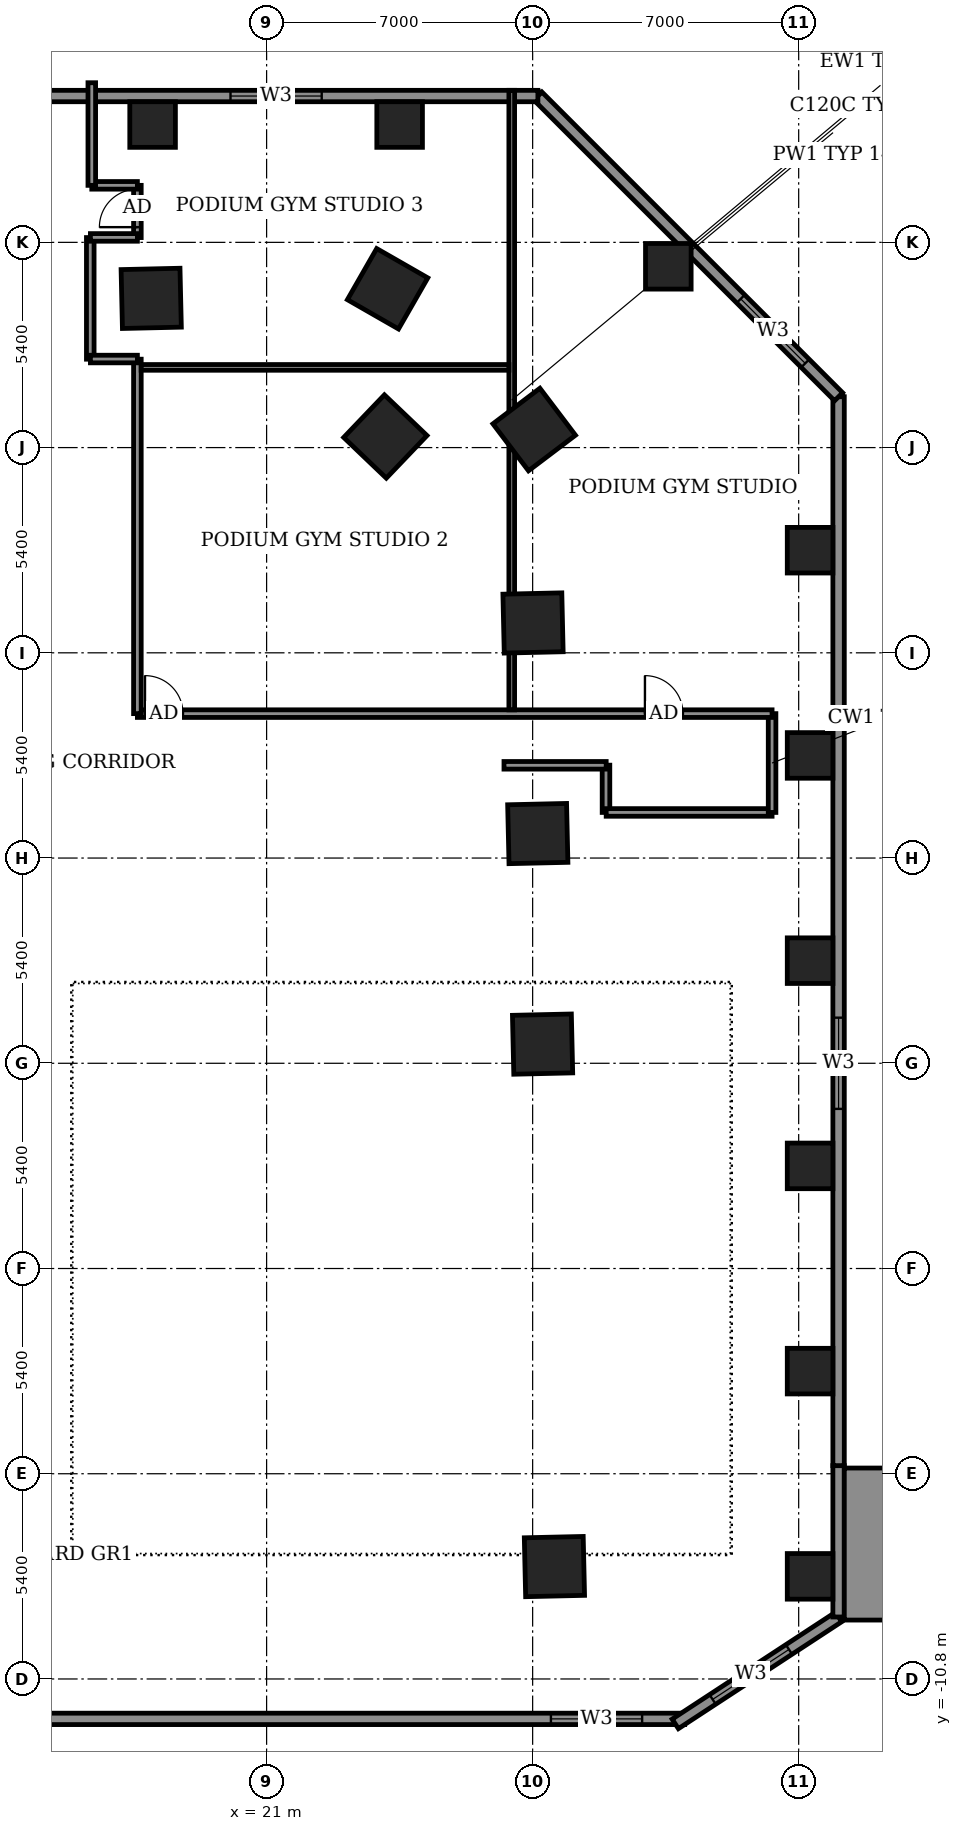
"""IFC4 building model, lengths in metres.
Left out: names, types, materials, properties, quantities, classifications, styles, units other than length and angle.
Written with IfcOpenShell. Run it as: python <this file> out.ifc"""

import sys

from ifc_helpers import new_model, si_unit, direction, frame, frame_2d, origin, origin_2d, place, context, subcontext, project, spatial, rectangle, extrude, element, fill, save


model = new_model("IFC4")
c1 = context("Model", 3, precision=1e-05, world=origin(), true_north=direction((0.0, 1.0)))
c2 = subcontext(c1, "Body", "Model", "MODEL_VIEW")
j1 = project(units=[si_unit("LENGTHUNIT", "METRE"), si_unit("PLANEANGLEUNIT", "RADIAN")], contexts=[c1])
p1 = place(None, origin())
s1 = spatial("IfcSite", under=j1, at=p1, CompositionType="ELEMENT")
p2 = place(p1, origin())
s2 = spatial("IfcBuilding", under=s1, at=p2, CompositionType="ELEMENT")
p3 = place(p2, frame((0.0, 0.0, 16.0)))
s3 = spatial("IfcBuildingStorey", under=s2, at=p3, CompositionType="ELEMENT", Elevation=16.0)
for number, where, z_axis, x_axis in (
    (1, (28.573, -7.843, -0.55), (0.0, 0.0, 1.0), (-0.023, 1.0, 0.0)),
    (2, (28.261, 5.904, -0.55), (0.0, 0.0, 1.0), (-0.023, 1.0, 0.0)),
    (3, (28.135, 11.444, -0.55), (0.0, 0.0, 1.0), (-0.023, 1.0, 0.0)),
    (4, (28.01, 16.985, -0.55), (0.0, 0.0, 1.0), (-0.023, 1.0, 0.0)),
    (5, (28.041, 22.075, -0.55), (0.0, 0.0, 1.0), (-0.604, 0.797, 0.0)),
    (6, (24.125, 21.892, -0.55), (0.0, 0.0, 1.0), (-0.723, 0.691, 0.0)),
    (7, (24.184, 25.779, -0.55), (0.0, 0.0, 1.0), (-0.868, 0.497, 0.0)),
    (8, (17.964, 25.526, -0.55), (0.0, 0.0, 1.0), (-1.0, -0.023, 0.0)),
):
    element("IfcColumn", number, at=place(p3, frame(where, z_axis=z_axis, x_axis=x_axis)), inside=s3, PredefinedType="COLUMN", context=c2, shape_type="SweptSolid", body=[
        extrude(rectangle(XDim=1.55, YDim=1.55, at=origin_2d()), origin(), (0.0, 0.0, 1.0), 4.5),
    ])
for number, where, z_axis, x_axis in (
    (9, (18.0, 30.1, -0.55), (0.0, 0.0, 1.0), (1.0, 0.0, 0.0)),
    (10, (24.5, 30.1, -0.55), (0.0, 0.0, 1.0), (1.0, 0.0, 0.0)),
    (11, (35.3, -8.1, -0.55), (0.0, 0.0, 1.0), (1.0, 0.0, 0.0)),
    (12, (35.3, -2.7, -0.55), (0.0, 0.0, 1.0), (1.0, 0.0, 0.0)),
    (13, (35.3, 2.7, -0.55), (0.0, 0.0, 1.0), (1.0, 0.0, 0.0)),
    (14, (35.3, 8.1, -0.55), (0.0, 0.0, 1.0), (1.0, 0.0, 0.0)),
    (15, (35.3, 13.5, -0.55), (0.0, 0.0, 1.0), (1.0, 0.0, 0.0)),
    (16, (35.3, 18.9, -0.55), (0.0, 0.0, 1.0), (1.0, 0.0, 0.0)),
    (17, (31.57, 26.37, -0.55), (0.0, 0.0, 1.0), (1.0, 0.0, 0.0)),
):
    element("IfcColumn", number, at=place(p3, frame(where, z_axis=z_axis, x_axis=x_axis)), inside=s3, PredefinedType="COLUMN", context=c2, shape_type="SweptSolid", body=[
        extrude(rectangle(XDim=1.2, YDim=1.2, at=origin_2d()), origin(), (0.0, 0.0, 1.0), 4.5),
    ])
p4 = place(p3, frame((15.0, -11.85, 0.0), z_axis=(0.0, 0.0, 1.0), x_axis=(1.0, 0.0, 0.0)))
e18 = element("IfcWall", 18, at=p4, inside=s3, PredefinedType="SOLIDWALL", context=c2, shape_type="SweptSolid", body=[
    extrude(rectangle(XDim=17.0, YDim=0.3, at=frame_2d((8.5, 0.0))), origin(), (0.0, 0.0, 1.0), 3.95),
])
p5 = place(p4, frame((13.481, 0.0, 0.9)))
e19 = element("IfcOpeningElement", 19, at=p5, cuts=e18, PredefinedType="OPENING", context=c2, shape_type="SweptSolid", body=[
    extrude(rectangle(XDim=2.4, YDim=1.8, at=frame_2d((1.2, 0.9))), frame((0.0, 0.16, 0.0), z_axis=(0.0, -1.0, 0.0), x_axis=(1.0, 0.0, 0.0)), (0.0, 0.0, 1.0), 0.32),
])
p6 = place(p3, frame((31.753, -11.982, 0.0), z_axis=(0.0, 0.0, 1.0), x_axis=(0.836672208926, 0.547703948142, 0.0)))
e20 = element("IfcWall", 20, at=p6, inside=s3, PredefinedType="SOLIDWALL", context=c2, shape_type="SweptSolid", body=[
    extrude(rectangle(XDim=5.136, YDim=0.3, at=frame_2d((2.568, 0.0))), origin(), (0.0, 0.0, 1.0), 3.95),
])
p7 = place(p6, frame((1.175, 0.0, 0.9)))
e21 = element("IfcOpeningElement", 21, at=p7, cuts=e20, PredefinedType="OPENING", context=c2, shape_type="SweptSolid", body=[
    extrude(rectangle(XDim=2.4, YDim=1.8, at=frame_2d((1.2, 0.9))), frame((0.0, 0.16, 0.0), z_axis=(0.0, -1.0, 0.0), x_axis=(1.0, 0.0, 0.0)), (0.0, 0.0, 1.0), 0.32),
])
p8 = place(p3, frame((36.05, -9.169, 0.0), z_axis=(0.0, 0.0, 1.0), x_axis=(0.0, 1.0, 0.0)))
e22 = element("IfcWall", 22, at=p8, inside=s3, PredefinedType="SOLIDWALL", context=c2, shape_type="SweptSolid", body=[
    extrude(rectangle(XDim=3.982, YDim=0.3, at=frame_2d((1.991, 0.0))), origin(), (0.0, 0.0, 1.0), 3.95),
])
p9 = place(p3, frame((36.05, -5.187, 0.0), z_axis=(0.0, 0.0, 1.0), x_axis=(0.0, 1.0, 0.0)))
e23 = element("IfcWall", 23, at=p9, inside=s3, PredefinedType="SOLIDWALL", context=c2, shape_type="SweptSolid", body=[
    extrude(rectangle(XDim=28.125, YDim=0.3, at=frame_2d((14.062, 0.0))), origin(), (0.0, 0.0, 1.0), 3.95),
])
p10 = place(p9, frame((9.387, 0.0, 0.9)))
e24 = element("IfcOpeningElement", 24, at=p10, cuts=e23, PredefinedType="OPENING", context=c2, shape_type="SweptSolid", body=[
    extrude(rectangle(XDim=2.4, YDim=1.8, at=frame_2d((1.2, 0.9))), frame((0.0, 0.16, 0.0), z_axis=(0.0, -1.0, 0.0), x_axis=(1.0, 0.0, 0.0)), (0.0, 0.0, 1.0), 0.32),
])
p11 = place(p3, frame((36.05, 22.938, 0.0), z_axis=(0.0, 0.0, 1.0), x_axis=(-0.707106781187, 0.707106781187, 0.0)))
e25 = element("IfcWall", 25, at=p11, inside=s3, PredefinedType="SOLIDWALL", context=c2, shape_type="SweptSolid", body=[
    extrude(rectangle(XDim=11.189, YDim=0.3, at=frame_2d((5.595, 0.0))), origin(), (0.0, 0.0, 1.0), 3.95),
])
p12 = place(p11, frame((1.242, 0.0, 0.9)))
e26 = element("IfcOpeningElement", 26, at=p12, cuts=e25, PredefinedType="OPENING", context=c2, shape_type="SweptSolid", body=[
    extrude(rectangle(XDim=2.4, YDim=1.8, at=frame_2d((1.2, 0.9))), frame((0.0, 0.16, 0.0), z_axis=(0.0, -1.0, 0.0), x_axis=(1.0, 0.0, 0.0)), (0.0, 0.0, 1.0), 0.32),
])
p13 = place(p3, frame((28.138, 30.85, 0.0), z_axis=(0.0, 0.0, 1.0), x_axis=(-1.0, 0.0, 0.0)))
e27 = element("IfcWall", 27, at=p13, inside=s3, PredefinedType="SOLIDWALL", context=c2, shape_type="SweptSolid", body=[
    extrude(rectangle(XDim=56.276, YDim=0.3, at=frame_2d((28.138, 0.0))), origin(), (0.0, 0.0, 1.0), 3.95),
])
p14 = place(p13, frame((5.688, 0.0, 0.9)))
e28 = element("IfcOpeningElement", 28, at=p14, cuts=e27, PredefinedType="OPENING", context=c2, shape_type="SweptSolid", body=[
    extrude(rectangle(XDim=2.4, YDim=1.8, at=frame_2d((1.2, 0.9))), frame((0.0, 0.16, 0.0), z_axis=(0.0, -1.0, 0.0), x_axis=(1.0, 0.0, 0.0)), (0.0, 0.0, 1.0), 0.32),
])
p15 = place(p13, frame((18.638, 0.0, 0.9)))
e29 = element("IfcOpeningElement", 29, at=p15, cuts=e27, PredefinedType="OPENING", context=c2, shape_type="SweptSolid", body=[
    extrude(rectangle(XDim=2.4, YDim=1.8, at=frame_2d((1.2, 0.9))), frame((0.0, 0.16, 0.0), z_axis=(0.0, -1.0, 0.0), x_axis=(1.0, 0.0, 0.0)), (0.0, 0.0, 1.0), 0.32),
])
p16 = place(p13, frame((26.178, 0.0, 0.9)))
e30 = element("IfcOpeningElement", 30, at=p16, cuts=e27, PredefinedType="OPENING", context=c2, shape_type="SweptSolid", body=[
    extrude(rectangle(XDim=2.4, YDim=1.8, at=frame_2d((1.2, 0.9))), frame((0.0, 0.16, 0.0), z_axis=(0.0, -1.0, 0.0), x_axis=(1.0, 0.0, 0.0)), (0.0, 0.0, 1.0), 0.32),
])
p17 = place(p13, frame((32.883, 0.0, 0.9)))
e31 = element("IfcOpeningElement", 31, at=p17, cuts=e27, PredefinedType="OPENING", context=c2, shape_type="SweptSolid", body=[
    extrude(rectangle(XDim=2.4, YDim=1.8, at=frame_2d((1.2, 0.9))), frame((0.0, 0.16, 0.0), z_axis=(0.0, -1.0, 0.0), x_axis=(1.0, 0.0, 0.0)), (0.0, 0.0, 1.0), 0.32),
])
p18 = place(p13, frame((40.263, 0.0, 0.9)))
e32 = element("IfcOpeningElement", 32, at=p18, cuts=e27, PredefinedType="OPENING", context=c2, shape_type="SweptSolid", body=[
    extrude(rectangle(XDim=2.4, YDim=1.8, at=frame_2d((1.2, 0.9))), frame((0.0, 0.16, 0.0), z_axis=(0.0, -1.0, 0.0), x_axis=(1.0, 0.0, 0.0)), (0.0, 0.0, 1.0), 0.32),
])
p19 = place(p13, frame((53.488, 0.0, 0.9)))
e33 = element("IfcOpeningElement", 33, at=p19, cuts=e27, PredefinedType="OPENING", context=c2, shape_type="SweptSolid", body=[
    extrude(rectangle(XDim=2.4, YDim=1.8, at=frame_2d((1.2, 0.9))), frame((0.0, 0.16, 0.0), z_axis=(0.0, -1.0, 0.0), x_axis=(1.0, 0.0, 0.0)), (0.0, 0.0, 1.0), 0.32),
])
p20 = place(p3, frame((37.45, -9.25, 0.0), z_axis=(0.0, 0.0, 1.0), x_axis=(0.0, 1.0, 0.0)))
e34 = element("IfcWall", 34, at=p20, inside=s3, PredefinedType="STANDARD", context=c2, shape_type="SweptSolid", body=[
    extrude(rectangle(XDim=4.0, YDim=2.5, at=frame_2d((2.0, 0.0))), origin(), (0.0, 0.0, 1.0), 4.5),
])
p21 = place(p3, frame((29.93, 12.0, 0.0), z_axis=(0.0, 0.0, 1.0), x_axis=(0.0, 1.0, 0.0)))
e35 = element("IfcWall", 35, at=p21, inside=s3, PredefinedType="PARTITIONING", context=c2, shape_type="SweptSolid", body=[
    extrude(rectangle(XDim=1.244, YDim=0.2, at=frame_2d((0.622, 0.0))), origin(), (0.0, 0.0, 1.0), 3.95),
])
p22 = place(p3, frame((29.935, 12.0, 0.0), z_axis=(0.0, 0.0, 1.0), x_axis=(1.0, 0.0, 0.0)))
e36 = element("IfcWall", 36, at=p22, inside=s3, PredefinedType="PARTITIONING", context=c2, shape_type="SweptSolid", body=[
    extrude(rectangle(XDim=4.365, YDim=0.2, at=frame_2d((2.183, 0.0))), origin(), (0.0, 0.0, 1.0), 3.95),
])
p23 = place(p3, frame((34.3, 12.0, 0.0), z_axis=(0.0, 0.0, 1.0), x_axis=(0.0, 1.0, 0.0)))
e37 = element("IfcWall", 37, at=p23, inside=s3, PredefinedType="PARTITIONING", context=c2, shape_type="SweptSolid", body=[
    extrude(rectangle(XDim=2.6, YDim=0.2, at=frame_2d((1.3, 0.0))), origin(), (0.0, 0.0, 1.0), 3.95),
])
p24 = place(p3, frame((27.246, 13.24, 0.0), z_axis=(0.0, 0.0, 1.0), x_axis=(1.0, 0.0, 0.0)))
e38 = element("IfcWall", 38, at=p24, inside=s3, PredefinedType="PARTITIONING", context=c2, shape_type="SweptSolid", body=[
    extrude(rectangle(XDim=2.689, YDim=0.2, at=frame_2d((1.344, 0.0))), origin(), (0.0, 0.0, 1.0), 3.95),
])
p25 = place(p3, frame((17.6, 14.6, 0.0), z_axis=(0.0, 0.0, 1.0), x_axis=(1.0, 0.0, 0.0)))
e39 = element("IfcWall", 39, at=p25, inside=s3, PredefinedType="PARTITIONING", context=c2, shape_type="SweptSolid", body=[
    extrude(rectangle(XDim=16.7, YDim=0.2, at=frame_2d((8.35, 0.0))), origin(), (0.0, 0.0, 1.0), 3.95),
])
p26 = place(p25, frame((13.355, 0.0, 0.0)))
e40 = element("IfcOpeningElement", 40, at=p26, cuts=e39, PredefinedType="OPENING", context=c2, shape_type="SweptSolid", body=[
    extrude(rectangle(XDim=1.0, YDim=2.1, at=frame_2d((0.5, 1.05))), frame((0.0, 0.11, 0.0), z_axis=(0.0, -1.0, 0.0), x_axis=(1.0, 0.0, 0.0)), (0.0, 0.0, 1.0), 0.22),
])
p27 = place(p25, frame((0.2, 0.0, 0.0)))
e41 = element("IfcOpeningElement", 41, at=p27, cuts=e39, PredefinedType="OPENING", context=c2, shape_type="SweptSolid", body=[
    extrude(rectangle(XDim=1.0, YDim=2.1, at=frame_2d((0.5, 1.05))), frame((0.0, 0.11, 0.0), z_axis=(0.0, -1.0, 0.0), x_axis=(1.0, 0.0, 0.0)), (0.0, 0.0, 1.0), 0.22),
])
p28 = place(p3, frame((17.6, 14.6, 0.0), z_axis=(0.0, 0.0, 1.0), x_axis=(0.0, 1.0, 0.0)))
e42 = element("IfcWall", 42, at=p28, inside=s3, PredefinedType="PARTITIONING", context=c2, shape_type="SweptSolid", body=[
    extrude(rectangle(XDim=9.326, YDim=0.2, at=frame_2d((4.663, 0.0))), origin(), (0.0, 0.0, 1.0), 3.95),
])
p29 = place(p3, frame((27.45, 14.7, 0.0), z_axis=(0.0, 0.0, 1.0), x_axis=(0.0, 1.0, 0.0)))
e43 = element("IfcWall", 43, at=p29, inside=s3, PredefinedType="PARTITIONING", context=c2, shape_type="SweptSolid", body=[
    extrude(rectangle(XDim=16.3, YDim=0.15, at=frame_2d((8.15, 0.0))), origin(), (0.0, 0.0, 1.0), 3.95),
])
p30 = place(p3, frame((17.7, 23.71, 0.0), z_axis=(0.0, 0.0, 1.0), x_axis=(1.0, 0.0, 0.0)))
e44 = element("IfcWall", 44, at=p30, inside=s3, PredefinedType="PARTITIONING", context=c2, shape_type="SweptSolid", body=[
    extrude(rectangle(XDim=9.675, YDim=0.15, at=frame_2d((4.837, 0.0))), origin(), (0.0, 0.0, 1.0), 3.95),
])
p31 = place(p3, frame((16.36, 23.926, 0.0), z_axis=(0.0, 0.0, 1.0), x_axis=(0.0, 1.0, 0.0)))
e45 = element("IfcWall", 45, at=p31, inside=s3, PredefinedType="PARTITIONING", context=c2, shape_type="SweptSolid", body=[
    extrude(rectangle(XDim=3.2, YDim=0.2, at=frame_2d((1.6, 0.0))), origin(), (0.0, 0.0, 1.0), 3.95),
])
p32 = place(p3, frame((16.364, 23.93, 0.0), z_axis=(0.0, 0.0, 1.0), x_axis=(1.0, 0.0, 0.0)))
e46 = element("IfcWall", 46, at=p32, inside=s3, PredefinedType="PARTITIONING", context=c2, shape_type="SweptSolid", body=[
    extrude(rectangle(XDim=1.236, YDim=0.2, at=frame_2d((0.618, 0.0))), origin(), (0.0, 0.0, 1.0), 3.95),
])
p33 = place(p3, frame((17.6, 27.126, 0.0), z_axis=(0.0, 0.0, 1.0), x_axis=(0.0, 1.0, 0.0)))
e47 = element("IfcWall", 47, at=p33, inside=s3, PredefinedType="PARTITIONING", context=c2, shape_type="SweptSolid", body=[
    extrude(rectangle(XDim=1.374, YDim=0.2, at=frame_2d((0.687, 0.0))), origin(), (0.0, 0.0, 1.0), 3.95),
])
p34 = place(p33, frame((0.274, 0.0, 0.0)))
e48 = element("IfcOpeningElement", 48, at=p34, cuts=e47, PredefinedType="OPENING", context=c2, shape_type="SweptSolid", body=[
    extrude(rectangle(XDim=1.0, YDim=2.1, at=frame_2d((0.5, 1.05))), frame((0.0, 0.11, 0.0), z_axis=(0.0, -1.0, 0.0), x_axis=(1.0, 0.0, 0.0)), (0.0, 0.0, 1.0), 0.22),
])
p35 = place(p3, frame((16.364, 27.13, 0.0), z_axis=(0.0, 0.0, 1.0), x_axis=(1.0, 0.0, 0.0)))
e49 = element("IfcWall", 49, at=p35, inside=s3, PredefinedType="PARTITIONING", context=c2, shape_type="SweptSolid", body=[
    extrude(rectangle(XDim=1.236, YDim=0.2, at=frame_2d((0.618, 0.0))), origin(), (0.0, 0.0, 1.0), 3.95),
])
p36 = place(p3, frame((16.4, 28.5, 0.0), z_axis=(0.0, 0.0, 1.0), x_axis=(1.0, 0.0, 0.0)))
e50 = element("IfcWall", 50, at=p36, inside=s3, PredefinedType="PARTITIONING", context=c2, shape_type="SweptSolid", body=[
    extrude(rectangle(XDim=1.2, YDim=0.2, at=frame_2d((0.6, 0.0))), origin(), (0.0, 0.0, 1.0), 3.95),
])
p37 = place(p3, frame((16.4, 28.5, 0.0), z_axis=(0.0, 0.0, 1.0), x_axis=(0.0, 1.0, 0.0)))
e51 = element("IfcWall", 51, at=p37, inside=s3, PredefinedType="PARTITIONING", context=c2, shape_type="SweptSolid", body=[
    extrude(rectangle(XDim=2.7, YDim=0.2, at=frame_2d((1.35, 0.0))), origin(), (0.0, 0.0, 1.0), 3.95),
])
p38 = place(p5, origin())
e52 = element("IfcWindow", 52, at=p38, inside=s3, PartitioningType="DOUBLE_PANEL_VERTICAL", PredefinedType="WINDOW", context=c2, shape_type="SweptSolid", body=[
    extrude(rectangle(XDim=2.4, YDim=1.8, at=frame_2d((1.2, 0.9))), frame((0.0, 0.03, 0.0), z_axis=(0.0, -1.0, 0.0), x_axis=(1.0, 0.0, 0.0)), (0.0, 0.0, 1.0), 0.06),
])
fill(e19, e52)
p39 = place(p7, origin())
e53 = element("IfcWindow", 53, at=p39, inside=s3, PartitioningType="DOUBLE_PANEL_VERTICAL", PredefinedType="WINDOW", context=c2, shape_type="SweptSolid", body=[
    extrude(rectangle(XDim=2.4, YDim=1.8, at=frame_2d((1.2, 0.9))), frame((0.0, 0.03, 0.0), z_axis=(0.0, -1.0, 0.0), x_axis=(1.0, 0.0, 0.0)), (0.0, 0.0, 1.0), 0.06),
])
fill(e21, e53)
p40 = place(p10, origin())
e54 = element("IfcWindow", 54, at=p40, inside=s3, PartitioningType="DOUBLE_PANEL_VERTICAL", PredefinedType="WINDOW", context=c2, shape_type="SweptSolid", body=[
    extrude(rectangle(XDim=2.4, YDim=1.8, at=frame_2d((1.2, 0.9))), frame((0.0, 0.03, 0.0), z_axis=(0.0, -1.0, 0.0), x_axis=(1.0, 0.0, 0.0)), (0.0, 0.0, 1.0), 0.06),
])
fill(e24, e54)
p41 = place(p12, origin())
e55 = element("IfcWindow", 55, at=p41, inside=s3, PartitioningType="DOUBLE_PANEL_VERTICAL", PredefinedType="WINDOW", context=c2, shape_type="SweptSolid", body=[
    extrude(rectangle(XDim=2.4, YDim=1.8, at=frame_2d((1.2, 0.9))), frame((0.0, 0.03, 0.0), z_axis=(0.0, -1.0, 0.0), x_axis=(1.0, 0.0, 0.0)), (0.0, 0.0, 1.0), 0.06),
])
fill(e26, e55)
p42 = place(p14, origin())
e56 = element("IfcWindow", 56, at=p42, inside=s3, PartitioningType="DOUBLE_PANEL_VERTICAL", PredefinedType="WINDOW", context=c2, shape_type="SweptSolid", body=[
    extrude(rectangle(XDim=2.4, YDim=1.8, at=frame_2d((1.2, 0.9))), frame((0.0, 0.03, 0.0), z_axis=(0.0, -1.0, 0.0), x_axis=(1.0, 0.0, 0.0)), (0.0, 0.0, 1.0), 0.06),
])
fill(e28, e56)
p43 = place(p26, origin())
e57 = element("IfcDoor", 57, at=p43, inside=s3, OperationType="SINGLE_SWING_LEFT", PredefinedType="DOOR", context=c2, shape_type="SweptSolid", body=[
    extrude(rectangle(XDim=1.0, YDim=2.1, at=frame_2d((0.5, 1.05))), frame((0.0, 0.025, 0.0), z_axis=(0.0, -1.0, 0.0), x_axis=(1.0, 0.0, 0.0)), (0.0, 0.0, 1.0), 0.05),
])
fill(e40, e57)
p44 = place(p27, origin())
e58 = element("IfcDoor", 58, at=p44, inside=s3, OperationType="SINGLE_SWING_RIGHT", PredefinedType="DOOR", context=c2, shape_type="SweptSolid", body=[
    extrude(rectangle(XDim=1.0, YDim=2.1, at=frame_2d((0.5, 1.05))), frame((0.0, 0.025, 0.0), z_axis=(0.0, -1.0, 0.0), x_axis=(1.0, 0.0, 0.0)), (0.0, 0.0, 1.0), 0.05),
])
fill(e41, e58)
p45 = place(p34, origin())
e59 = element("IfcDoor", 59, at=p45, inside=s3, OperationType="SINGLE_SWING_LEFT", PredefinedType="DOOR", context=c2, shape_type="SweptSolid", body=[
    extrude(rectangle(XDim=1.0, YDim=2.1, at=frame_2d((0.5, 1.05))), frame((0.0, 0.025, 0.0), z_axis=(0.0, -1.0, 0.0), x_axis=(1.0, 0.0, 0.0)), (0.0, 0.0, 1.0), 0.05),
])
fill(e48, e59)
save(model, sys.argv[1])
